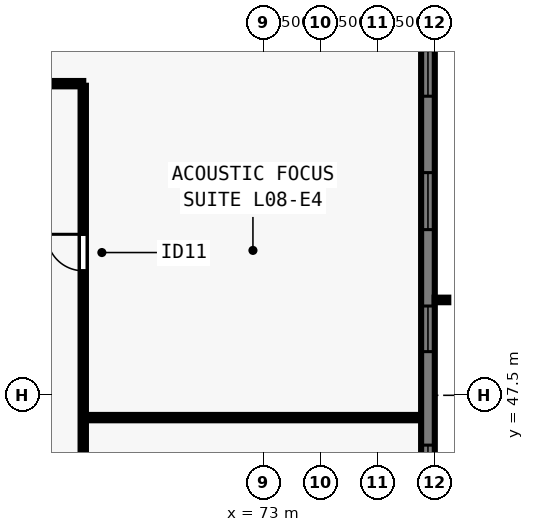
"""IFC4 building model, lengths in metres.
Left out: names, types, materials, properties, quantities, classifications, styles, units other than length and angle.
Written with IfcOpenShell. Run it as: python <this file> out.ifc"""

import sys

from ifc_helpers import new_model, si_unit, direction, frame, frame_2d, origin, place, context, subcontext, project, spatial, rectangle, extrude, element, fill, save


model = new_model("IFC4")
c1 = context("Model", 3, precision=1e-05, world=origin(), true_north=direction((0.0, 1.0)))
c2 = subcontext(c1, "Body", "Model", "MODEL_VIEW")
j1 = project(units=[si_unit("LENGTHUNIT", "METRE"), si_unit("PLANEANGLEUNIT", "RADIAN")], contexts=[c1])
p1 = place(None, origin())
s1 = spatial("IfcSite", under=j1, at=p1, CompositionType="ELEMENT")
p2 = place(p1, origin())
s2 = spatial("IfcBuilding", under=s1, at=p2, CompositionType="ELEMENT")
p3 = place(p2, frame((0.0, 0.0, 34.0)))
s3 = spatial("IfcBuildingStorey", under=s2, at=p3, CompositionType="ELEMENT", Elevation=34.0)
p4 = place(p3, frame((77.32, 61.5, 0.0), z_axis=(0.0, 0.0, 1.0), x_axis=(0.0, -1.0, 0.0)))
e1 = element("IfcWall", 1, at=p4, inside=s3, PredefinedType="SOLIDWALL", context=c2, shape_type="SweptSolid", body=[
    extrude(rectangle(XDim=44.662, YDim=0.36, at=frame_2d((22.331, 0.0))), origin(), (0.0, 0.0, 1.0), 3.28),
])
p5 = place(p4, frame((4.93, 0.0, 0.8)))
e2 = element("IfcOpeningElement", 2, at=p5, cuts=e1, PredefinedType="OPENING", context=c2, shape_type="SweptSolid", body=[
    extrude(rectangle(XDim=1.2, YDim=1.544, at=frame_2d((0.6, 0.772))), frame((0.0, 0.19, 0.0), z_axis=(0.0, -1.0, 0.0), x_axis=(1.0, 0.0, 0.0)), (0.0, 0.0, 1.0), 0.38),
])
p6 = place(p4, frame((8.14, 0.0, 0.8)))
e3 = element("IfcOpeningElement", 3, at=p6, cuts=e1, PredefinedType="OPENING", context=c2, shape_type="SweptSolid", body=[
    extrude(rectangle(XDim=1.5, YDim=1.544, at=frame_2d((0.75, 0.772))), frame((0.0, 0.19, 0.0), z_axis=(0.0, -1.0, 0.0), x_axis=(1.0, 0.0, 0.0)), (0.0, 0.0, 1.0), 0.38),
])
p7 = place(p4, frame((11.65, 0.0, 0.8)))
e4 = element("IfcOpeningElement", 4, at=p7, cuts=e1, PredefinedType="OPENING", context=c2, shape_type="SweptSolid", body=[
    extrude(rectangle(XDim=1.2, YDim=1.544, at=frame_2d((0.6, 0.772))), frame((0.0, 0.19, 0.0), z_axis=(0.0, -1.0, 0.0), x_axis=(1.0, 0.0, 0.0)), (0.0, 0.0, 1.0), 0.38),
])
p8 = place(p4, frame((15.311, 0.0, 0.8)))
e5 = element("IfcOpeningElement", 5, at=p8, cuts=e1, PredefinedType="OPENING", context=c2, shape_type="SweptSolid", body=[
    extrude(rectangle(XDim=1.5, YDim=1.544, at=frame_2d((0.75, 0.772))), frame((0.0, 0.19, 0.0), z_axis=(0.0, -1.0, 0.0), x_axis=(1.0, 0.0, 0.0)), (0.0, 0.0, 1.0), 0.38),
])
p9 = place(p4, frame((18.821, 0.0, 0.8)))
e6 = element("IfcOpeningElement", 6, at=p9, cuts=e1, PredefinedType="OPENING", context=c2, shape_type="SweptSolid", body=[
    extrude(rectangle(XDim=1.2, YDim=1.544, at=frame_2d((0.6, 0.772))), frame((0.0, 0.19, 0.0), z_axis=(0.0, -1.0, 0.0), x_axis=(1.0, 0.0, 0.0)), (0.0, 0.0, 1.0), 0.38),
])
p10 = place(p4, frame((20.331, 0.0, 0.8)))
e7 = element("IfcOpeningElement", 7, at=p10, cuts=e1, PredefinedType="OPENING", context=c2, shape_type="SweptSolid", body=[
    extrude(rectangle(XDim=1.5, YDim=1.544, at=frame_2d((0.75, 0.772))), frame((0.0, 0.19, 0.0), z_axis=(0.0, -1.0, 0.0), x_axis=(1.0, 0.0, 0.0)), (0.0, 0.0, 1.0), 0.38),
])
p11 = place(p4, frame((25.091, 0.0, 0.8)))
e8 = element("IfcOpeningElement", 8, at=p11, cuts=e1, PredefinedType="OPENING", context=c2, shape_type="SweptSolid", body=[
    extrude(rectangle(XDim=1.2, YDim=1.544, at=frame_2d((0.6, 0.772))), frame((0.0, 0.19, 0.0), z_axis=(0.0, -1.0, 0.0), x_axis=(1.0, 0.0, 0.0)), (0.0, 0.0, 1.0), 0.38),
])
p12 = place(p4, frame((28.302, 0.0, 0.8)))
e9 = element("IfcOpeningElement", 9, at=p12, cuts=e1, PredefinedType="OPENING", context=c2, shape_type="SweptSolid", body=[
    extrude(rectangle(XDim=1.5, YDim=1.544, at=frame_2d((0.75, 0.772))), frame((0.0, 0.19, 0.0), z_axis=(0.0, -1.0, 0.0), x_axis=(1.0, 0.0, 0.0)), (0.0, 0.0, 1.0), 0.38),
])
p13 = place(p4, frame((31.812, 0.0, 0.8)))
e10 = element("IfcOpeningElement", 10, at=p13, cuts=e1, PredefinedType="OPENING", context=c2, shape_type="SweptSolid", body=[
    extrude(rectangle(XDim=1.2, YDim=1.544, at=frame_2d((0.6, 0.772))), frame((0.0, 0.19, 0.0), z_axis=(0.0, -1.0, 0.0), x_axis=(1.0, 0.0, 0.0)), (0.0, 0.0, 1.0), 0.38),
])
p14 = place(p4, frame((35.022, 0.0, 0.8)))
e11 = element("IfcOpeningElement", 11, at=p14, cuts=e1, PredefinedType="OPENING", context=c2, shape_type="SweptSolid", body=[
    extrude(rectangle(XDim=1.5, YDim=1.544, at=frame_2d((0.75, 0.772))), frame((0.0, 0.19, 0.0), z_axis=(0.0, -1.0, 0.0), x_axis=(1.0, 0.0, 0.0)), (0.0, 0.0, 1.0), 0.38),
])
p15 = place(p4, frame((38.532, 0.0, 0.8)))
e12 = element("IfcOpeningElement", 12, at=p15, cuts=e1, PredefinedType="OPENING", context=c2, shape_type="SweptSolid", body=[
    extrude(rectangle(XDim=1.2, YDim=1.544, at=frame_2d((0.6, 0.772))), frame((0.0, 0.19, 0.0), z_axis=(0.0, -1.0, 0.0), x_axis=(1.0, 0.0, 0.0)), (0.0, 0.0, 1.0), 0.38),
])
p16 = place(p3, frame((35.75, 55.7, 0.0), z_axis=(0.0, 0.0, 1.0), x_axis=(1.0, 0.0, 0.0)))
e13 = element("IfcWall", 13, at=p16, inside=s3, PredefinedType="PARTITIONING", context=c2, shape_type="SweptSolid", body=[
    extrude(rectangle(XDim=32.5, YDim=0.14, at=frame_2d((16.25, 0.0))), origin(), (0.0, 0.0, 1.0), 3.28),
])
p17 = place(p16, frame((3.154, 0.0, 0.0)))
e14 = element("IfcOpeningElement", 14, at=p17, cuts=e13, PredefinedType="OPENING", context=c2, shape_type="SweptSolid", body=[
    extrude(rectangle(XDim=0.96, YDim=2.12, at=frame_2d((0.48, 1.06))), frame((0.0, 0.08, 0.0), z_axis=(0.0, -1.0, 0.0), x_axis=(1.0, 0.0, 0.0)), (0.0, 0.0, 1.0), 0.16),
])
p18 = place(p16, frame((27.834, 0.0, 0.0)))
e15 = element("IfcOpeningElement", 15, at=p18, cuts=e13, PredefinedType="OPENING", context=c2, shape_type="SweptSolid", body=[
    extrude(rectangle(XDim=0.96, YDim=2.12, at=frame_2d((0.48, 1.06))), frame((0.0, 0.08, 0.0), z_axis=(0.0, -1.0, 0.0), x_axis=(1.0, 0.0, 0.0)), (0.0, 0.0, 1.0), 0.16),
])
p19 = place(p3, frame((68.25, 22.355, 0.0), z_axis=(0.0, 0.0, 1.0), x_axis=(0.0, 1.0, 0.0)))
e16 = element("IfcWall", 16, at=p19, inside=s3, PredefinedType="PARTITIONING", context=c2, shape_type="SweptSolid", body=[
    extrude(rectangle(XDim=33.29, YDim=0.14, at=frame_2d((16.645, 0.0))), origin(), (0.0, 0.0, 1.0), 3.28),
])
p20 = place(p19, frame((3.522, 0.0, 0.0)))
e17 = element("IfcOpeningElement", 17, at=p20, cuts=e16, PredefinedType="OPENING", context=c2, shape_type="SweptSolid", body=[
    extrude(rectangle(XDim=0.96, YDim=2.12, at=frame_2d((0.48, 1.06))), frame((0.0, 0.08, 0.0), z_axis=(0.0, -1.0, 0.0), x_axis=(1.0, 0.0, 0.0)), (0.0, 0.0, 1.0), 0.16),
])
p21 = place(p19, frame((11.956, 0.0, 0.0)))
e18 = element("IfcOpeningElement", 18, at=p21, cuts=e16, PredefinedType="OPENING", context=c2, shape_type="SweptSolid", body=[
    extrude(rectangle(XDim=0.96, YDim=2.12, at=frame_2d((0.48, 1.06))), frame((0.0, 0.08, 0.0), z_axis=(0.0, -1.0, 0.0), x_axis=(1.0, 0.0, 0.0)), (0.0, 0.0, 1.0), 0.16),
])
p22 = place(p19, frame((20.256, 0.0, 0.0)))
e19 = element("IfcOpeningElement", 19, at=p22, cuts=e16, PredefinedType="OPENING", context=c2, shape_type="SweptSolid", body=[
    extrude(rectangle(XDim=0.96, YDim=2.12, at=frame_2d((0.48, 1.06))), frame((0.0, 0.08, 0.0), z_axis=(0.0, -1.0, 0.0), x_axis=(1.0, 0.0, 0.0)), (0.0, 0.0, 1.0), 0.16),
])
p23 = place(p19, frame((28.422, 0.0, 0.0)))
e20 = element("IfcOpeningElement", 20, at=p23, cuts=e16, PredefinedType="OPENING", context=c2, shape_type="SweptSolid", body=[
    extrude(rectangle(XDim=0.96, YDim=2.12, at=frame_2d((0.48, 1.06))), frame((0.0, 0.08, 0.0), z_axis=(0.0, -1.0, 0.0), x_axis=(1.0, 0.0, 0.0)), (0.0, 0.0, 1.0), 0.16),
])
p24 = place(p3, frame((68.35, 46.913, 0.0), z_axis=(0.0, 0.0, 1.0), x_axis=(1.0, 0.0, 0.0)))
e21 = element("IfcWall", 21, at=p24, inside=s3, PredefinedType="PARTITIONING", context=c2, shape_type="SweptSolid", body=[
    extrude(rectangle(XDim=8.73, YDim=0.14, at=frame_2d((4.365, 0.0))), origin(), (0.0, 0.0, 1.0), 3.28),
])
p25 = place(p5, origin())
e22 = element("IfcWindow", 22, at=p25, inside=s3, PartitioningType="SINGLE_PANEL", PredefinedType="WINDOW", context=c2, shape_type="SweptSolid", body=[
    extrude(rectangle(XDim=1.2, YDim=1.544, at=frame_2d((0.6, 0.772))), frame((0.0, -0.05, 0.0), z_axis=(0.0, -1.0, 0.0), x_axis=(1.0, 0.0, 0.0)), (0.0, 0.0, 1.0), 0.06),
])
fill(e2, e22)
p26 = place(p6, origin())
e23 = element("IfcWindow", 23, at=p26, inside=s3, PartitioningType="SINGLE_PANEL", PredefinedType="WINDOW", context=c2, shape_type="SweptSolid", body=[
    extrude(rectangle(XDim=1.5, YDim=1.544, at=frame_2d((0.75, 0.772))), frame((0.0, -0.05, 0.0), z_axis=(0.0, -1.0, 0.0), x_axis=(1.0, 0.0, 0.0)), (0.0, 0.0, 1.0), 0.06),
])
fill(e3, e23)
p27 = place(p7, origin())
e24 = element("IfcWindow", 24, at=p27, inside=s3, PartitioningType="SINGLE_PANEL", PredefinedType="WINDOW", context=c2, shape_type="SweptSolid", body=[
    extrude(rectangle(XDim=1.2, YDim=1.544, at=frame_2d((0.6, 0.772))), frame((0.0, -0.05, 0.0), z_axis=(0.0, -1.0, 0.0), x_axis=(1.0, 0.0, 0.0)), (0.0, 0.0, 1.0), 0.06),
])
fill(e4, e24)
p28 = place(p8, origin())
e25 = element("IfcWindow", 25, at=p28, inside=s3, PartitioningType="SINGLE_PANEL", PredefinedType="WINDOW", context=c2, shape_type="SweptSolid", body=[
    extrude(rectangle(XDim=1.5, YDim=1.544, at=frame_2d((0.75, 0.772))), frame((0.0, -0.05, 0.0), z_axis=(0.0, -1.0, 0.0), x_axis=(1.0, 0.0, 0.0)), (0.0, 0.0, 1.0), 0.06),
])
fill(e5, e25)
p29 = place(p23, origin())
e26 = element("IfcDoor", 26, at=p29, inside=s3, OperationType="SINGLE_SWING_RIGHT", PredefinedType="DOOR", context=c2, shape_type="SweptSolid", body=[
    extrude(rectangle(XDim=0.96, YDim=2.12, at=frame_2d((0.48, 1.06))), frame((0.0, 0.025, 0.0), z_axis=(0.0, -1.0, 0.0), x_axis=(1.0, 0.0, 0.0)), (0.0, 0.0, 1.0), 0.05),
])
fill(e20, e26)
save(model, sys.argv[1])
